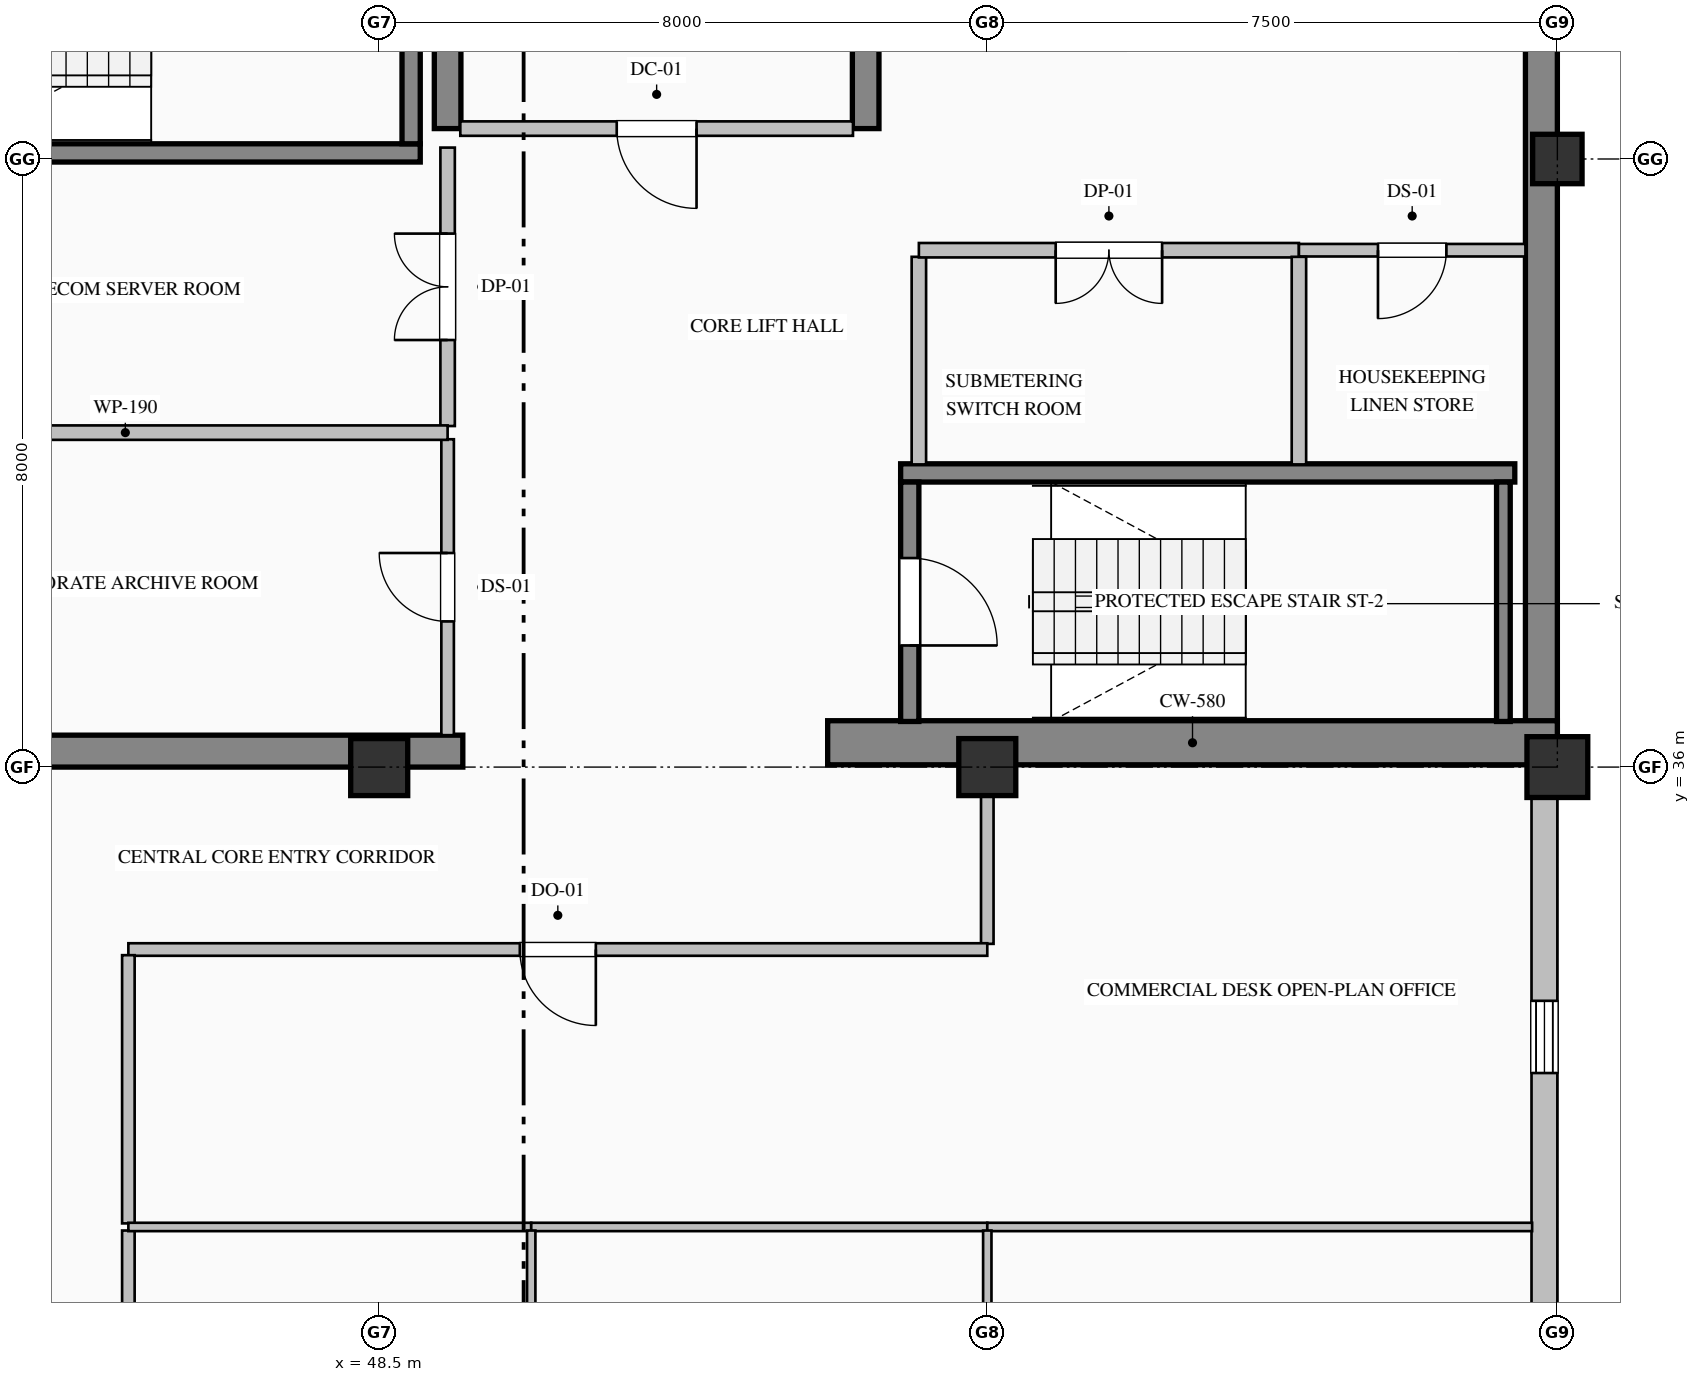
"""IFC4 building model, lengths in metres.
Left out: names, types, materials, properties, quantities, classifications, styles, units other than length and angle.
Written with IfcOpenShell. Run it as: python <this file> out.ifc"""

import sys

from ifc_helpers import new_model, si_unit, direction, frame, frame_2d, origin, origin_2d, place, context, subcontext, project, spatial, rectangle, hollow_rectangle, extrude, element, fill, save


model = new_model("IFC4")
c1 = context("Model", 3, precision=1e-05, world=origin(), true_north=direction((0.0, 1.0)))
c2 = subcontext(c1, "Body", "Model", "MODEL_VIEW")
j1 = project(units=[si_unit("LENGTHUNIT", "METRE"), si_unit("PLANEANGLEUNIT", "RADIAN")], contexts=[c1])
p1 = place(None, origin())
s1 = spatial("IfcSite", under=j1, at=p1, CompositionType="ELEMENT")
p2 = place(p1, origin())
s2 = spatial("IfcBuilding", under=s1, at=p2, CompositionType="ELEMENT")
p3 = place(p2, frame((0.0, 0.0, 359.2)))
s3 = spatial("IfcBuildingStorey", under=s2, at=p3, CompositionType="ELEMENT", Elevation=359.2)
p4 = place(p3, frame((63.79, 36.32, 0.0), z_axis=(0.0, 0.0, 1.0), x_axis=(0.0, 1.0, 0.0)))
e1 = element("IfcWall", 1, at=p4, inside=s3, PredefinedType="SHEAR", context=c2, shape_type="SweptSolid", body=[
    extrude(rectangle(XDim=15.26, YDim=0.42, at=frame_2d((7.63, 0.0))), origin(), (0.0, 0.0, 1.0), 3.785),
])
p5 = place(p3, frame((40.5, 36.21, 0.0), z_axis=(0.0, 0.0, 1.0), x_axis=(1.0, 0.0, 0.0)))
e2 = element("IfcWall", 2, at=p5, inside=s3, PredefinedType="SHEAR", context=c2, shape_type="SweptSolid", body=[
    extrude(rectangle(XDim=9.1, YDim=0.42, at=frame_2d((4.55, 0.0))), origin(), (0.0, 0.0, 1.0), 3.785),
])
p6 = place(p3, frame((54.4, 36.32, 0.0), z_axis=(0.0, 0.0, 1.0), x_axis=(1.0, 0.0, 0.0)))
e3 = element("IfcWall", 3, at=p6, inside=s3, PredefinedType="SHEAR", context=c2, shape_type="SweptSolid", body=[
    extrude(rectangle(XDim=9.6, YDim=0.58, at=frame_2d((4.8, 0.0))), origin(), (0.0, 0.0, 1.0), 4.0),
])
p7 = place(p3, frame((49.4, 44.4, 0.0), z_axis=(0.0, 0.0, 1.0), x_axis=(0.0, 1.0, 0.0)))
e4 = element("IfcWall", 4, at=p7, inside=s3, PredefinedType="SHEAR", context=c2, shape_type="SweptSolid", body=[
    extrude(rectangle(XDim=3.0, YDim=0.35, at=frame_2d((1.5, 0.0))), origin(), (0.0, 0.0, 1.0), 3.785),
])
p8 = place(p3, frame((54.9, 44.4, 0.0), z_axis=(0.0, 0.0, 1.0), x_axis=(0.0, 1.0, 0.0)))
e5 = element("IfcWall", 5, at=p8, inside=s3, PredefinedType="SHEAR", context=c2, shape_type="SweptSolid", body=[
    extrude(rectangle(XDim=7.18, YDim=0.35, at=frame_2d((3.59, 0.0))), origin(), (0.0, 0.0, 1.0), 3.785),
])
for number, where, z_axis, x_axis in (
    (6, (48.5, 36.0, 0.0), (0.0, 0.0, 1.0), (1.0, 0.0, 0.0)),
    (7, (56.5, 36.0, 0.0), (0.0, 0.0, 1.0), (1.0, 0.0, 0.0)),
):
    element("IfcColumn", number, at=place(p3, frame(where, z_axis=z_axis, x_axis=x_axis)), inside=s3, PredefinedType="COLUMN", context=c2, shape_type="SweptSolid", body=[
        extrude(rectangle(XDim=0.75, YDim=0.75, at=origin_2d()), origin(), (0.0, 0.0, 1.0), 4.0),
    ])
p9 = place(p3, frame((64.0, 36.0, 0.0), z_axis=(0.0, 0.0, 1.0), x_axis=(1.0, 0.0, 0.0)))
e8 = element("IfcColumn", 8, at=p9, inside=s3, PredefinedType="COLUMN", context=c2, shape_type="SweptSolid", body=[
    extrude(hollow_rectangle(XDim=0.8, YDim=0.8, WallThickness=0.032, at=origin_2d()), origin(), (0.0, 0.0, 1.0), 4.0),
])
p10 = place(p3, frame((64.0, 44.0, 0.0), z_axis=(0.0, 0.0, 1.0), x_axis=(1.0, 0.0, 0.0)))
e9 = element("IfcColumn", 9, at=p10, inside=s3, PredefinedType="COLUMN", context=c2, shape_type="SweptSolid", body=[
    extrude(hollow_rectangle(XDim=0.65, YDim=0.65, WallThickness=0.028, at=origin_2d()), origin(), (0.0, 0.0, 1.0), 4.0),
])
p11 = place(p3, frame((63.83, 36.05, 0.0), z_axis=(0.0, 0.0, 1.0), x_axis=(0.0, -1.0, 0.0)))
e10 = element("IfcWall", 10, at=p11, inside=s3, PredefinedType="SOLIDWALL", context=c2, shape_type="SweptSolid", body=[
    extrude(rectangle(XDim=13.55, YDim=0.34, at=frame_2d((6.775, 0.0))), origin(), (0.0, 0.0, 1.0), 3.335),
])
p12 = place(p11, frame((3.125, 0.0, 0.9)))
e11 = element("IfcOpeningElement", 11, at=p12, cuts=e10, PredefinedType="OPENING", context=c2, shape_type="SweptSolid", body=[
    extrude(rectangle(XDim=0.95, YDim=1.85, at=frame_2d((0.475, 0.925))), frame((0.0, 0.18, 0.0), z_axis=(0.0, -1.0, 0.0), x_axis=(1.0, 0.0, 0.0)), (0.0, 0.0, 1.0), 0.36),
])
p13 = place(p3, frame((49.04, 44.08, 0.0), z_axis=(0.0, 0.0, 1.0), x_axis=(-1.0, 0.0, 0.0)))
e12 = element("IfcWall", 12, at=p13, inside=s3, PredefinedType="SOLIDWALL", context=c2, shape_type="SweptSolid", body=[
    extrude(rectangle(XDim=8.08, YDim=0.24, at=frame_2d((4.04, 0.0))), origin(), (0.0, 0.0, 1.0), 4.0),
])
p14 = place(p3, frame((48.92, 44.2, 0.0), z_axis=(0.0, 0.0, 1.0), x_axis=(0.0, 1.0, 0.0)))
e13 = element("IfcWall", 13, at=p14, inside=s3, PredefinedType="SOLIDWALL", context=c2, shape_type="SweptSolid", body=[
    extrude(rectangle(XDim=3.15, YDim=0.24, at=frame_2d((1.575, 0.0))), origin(), (0.0, 0.0, 1.0), 4.0),
])
p15 = place(p3, frame((55.36, 39.87, 0.0), z_axis=(0.0, 0.0, 1.0), x_axis=(1.0, 0.0, 0.0)))
e14 = element("IfcWall", 14, at=p15, inside=s3, PredefinedType="SOLIDWALL", context=c2, shape_type="SweptSolid", body=[
    extrude(rectangle(XDim=8.08, YDim=0.24, at=frame_2d((4.04, 0.0))), origin(), (0.0, 0.0, 1.0), 4.0),
])
p16 = place(p3, frame((55.48, 39.75, 0.0), z_axis=(0.0, 0.0, 1.0), x_axis=(0.0, -1.0, 0.0)))
e15 = element("IfcWall", 15, at=p16, inside=s3, PredefinedType="SOLIDWALL", context=c2, shape_type="SweptSolid", body=[
    extrude(rectangle(XDim=3.15, YDim=0.24, at=frame_2d((1.575, 0.0))), origin(), (0.0, 0.0, 1.0), 4.0),
])
p17 = place(p16, frame((1.0, 0.0, 0.0)))
e16 = element("IfcOpeningElement", 16, at=p17, cuts=e15, PredefinedType="OPENING", context=c2, shape_type="SweptSolid", body=[
    extrude(rectangle(XDim=1.15, YDim=2.2, at=frame_2d((0.575, 1.1))), frame((0.0, 0.13, 0.0), z_axis=(0.0, -1.0, 0.0), x_axis=(1.0, 0.0, 0.0)), (0.0, 0.0, 1.0), 0.26),
])
p18 = place(p3, frame((63.29, 36.6, 0.0), z_axis=(0.0, 0.0, 1.0), x_axis=(0.0, 1.0, 0.0)))
e17 = element("IfcWall", 17, at=p18, inside=s3, PredefinedType="SOLIDWALL", context=c2, shape_type="SweptSolid", body=[
    extrude(rectangle(XDim=3.15, YDim=0.18, at=frame_2d((1.575, 0.0))), origin(), (0.0, 0.0, 1.0), 4.0),
])
p19 = place(p3, frame((54.733, 44.4, 0.0), z_axis=(0.0, 0.0, 1.0), x_axis=(-1.0, 0.0, 0.0)))
e18 = element("IfcWall", 18, at=p19, inside=s3, PredefinedType="PARTITIONING", context=c2, shape_type="SweptSolid", body=[
    extrude(rectangle(XDim=5.166, YDim=0.19, at=frame_2d((2.583, 0.0))), origin(), (0.0, 0.0, 1.0), 3.785),
])
p20 = place(p19, frame((2.058, 0.0, 0.0)))
e19 = element("IfcOpeningElement", 19, at=p20, cuts=e18, PredefinedType="OPENING", context=c2, shape_type="SweptSolid", body=[
    extrude(rectangle(XDim=1.05, YDim=2.15, at=frame_2d((0.525, 1.075))), frame((0.0, 0.105, 0.0), z_axis=(0.0, -1.0, 0.0), x_axis=(1.0, 0.0, 0.0)), (0.0, 0.0, 1.0), 0.21),
])
p21 = place(p3, frame((49.4, 36.42, 0.0), z_axis=(0.0, 0.0, 1.0), x_axis=(0.0, 1.0, 0.0)))
e20 = element("IfcWall", 20, at=p21, inside=s3, PredefinedType="PARTITIONING", context=c2, shape_type="SweptSolid", body=[
    extrude(rectangle(XDim=3.893, YDim=0.165, at=frame_2d((1.947, 0.0))), origin(), (0.0, 0.0, 1.0), 3.027),
])
p22 = place(p21, frame((1.497, 0.0, 0.0)))
e21 = element("IfcOpeningElement", 21, at=p22, cuts=e20, PredefinedType="OPENING", context=c2, shape_type="SweptSolid", body=[
    extrude(rectangle(XDim=0.9, YDim=2.15, at=frame_2d((0.45, 1.075))), frame((0.0, 0.093, 0.0), z_axis=(0.0, -1.0, 0.0), x_axis=(1.0, 0.0, 0.0)), (0.0, 0.0, 1.0), 0.185),
])
p23 = place(p3, frame((49.4, 40.487, 0.0), z_axis=(0.0, 0.0, 1.0), x_axis=(0.0, 1.0, 0.0)))
e22 = element("IfcWall", 22, at=p23, inside=s3, PredefinedType="PARTITIONING", context=c2, shape_type="SweptSolid", body=[
    extrude(rectangle(XDim=3.663, YDim=0.19, at=frame_2d((1.832, 0.0))), origin(), (0.0, 0.0, 1.0), 3.027),
])
p24 = place(p23, frame((1.132, 0.0, 0.0)))
e23 = element("IfcOpeningElement", 23, at=p24, cuts=e22, PredefinedType="OPENING", context=c2, shape_type="SweptSolid", body=[
    extrude(rectangle(XDim=1.4, YDim=2.25, at=frame_2d((0.7, 1.125))), frame((0.0, 0.105, 0.0), z_axis=(0.0, -1.0, 0.0), x_axis=(1.0, 0.0, 0.0)), (0.0, 0.0, 1.0), 0.21),
])
p25 = place(p3, frame((55.6, 42.713, 0.0), z_axis=(0.0, 0.0, 1.0), x_axis=(0.0, -1.0, 0.0)))
e24 = element("IfcWall", 24, at=p25, inside=s3, PredefinedType="PARTITIONING", context=c2, shape_type="SweptSolid", body=[
    extrude(rectangle(XDim=2.731, YDim=0.19, at=frame_2d((1.365, 0.0))), origin(), (0.0, 0.0, 1.0), 3.785),
])
p26 = place(p3, frame((40.92, 40.4, 0.0), z_axis=(0.0, 0.0, 1.0), x_axis=(1.0, 0.0, 0.0)))
e25 = element("IfcWall", 25, at=p26, inside=s3, PredefinedType="PARTITIONING", context=c2, shape_type="SweptSolid", body=[
    extrude(rectangle(XDim=8.48, YDim=0.19, at=frame_2d((4.24, 0.0))), origin(), (0.0, 0.0, 1.0), 3.785),
])
p27 = place(p3, frame((60.6, 42.8, 0.0), z_axis=(0.0, 0.0, 1.0), x_axis=(-1.0, 0.0, 0.0)))
e26 = element("IfcWall", 26, at=p27, inside=s3, PredefinedType="PARTITIONING", context=c2, shape_type="SweptSolid", body=[
    extrude(rectangle(XDim=5.0, YDim=0.19, at=frame_2d((2.5, 0.0))), origin(), (0.0, 0.0, 1.0), 3.785),
])
p28 = place(p27, frame((1.8, 0.0, 0.0)))
e27 = element("IfcOpeningElement", 27, at=p28, cuts=e26, PredefinedType="OPENING", context=c2, shape_type="SweptSolid", body=[
    extrude(rectangle(XDim=1.4, YDim=2.25, at=frame_2d((0.7, 1.125))), frame((0.0, 0.105, 0.0), z_axis=(0.0, -1.0, 0.0), x_axis=(1.0, 0.0, 0.0)), (0.0, 0.0, 1.0), 0.21),
])
p29 = place(p3, frame((63.58, 42.8, 0.0), z_axis=(0.0, 0.0, 1.0), x_axis=(-1.0, 0.0, 0.0)))
e28 = element("IfcWall", 28, at=p29, inside=s3, PredefinedType="PARTITIONING", context=c2, shape_type="SweptSolid", body=[
    extrude(rectangle(XDim=2.98, YDim=0.165, at=frame_2d((1.49, 0.0))), origin(), (0.0, 0.0, 1.0), 3.785),
])
p30 = place(p29, frame((1.04, 0.0, 0.0)))
e29 = element("IfcOpeningElement", 29, at=p30, cuts=e28, PredefinedType="OPENING", context=c2, shape_type="SweptSolid", body=[
    extrude(rectangle(XDim=0.9, YDim=2.15, at=frame_2d((0.45, 1.075))), frame((0.0, 0.093, 0.0), z_axis=(0.0, -1.0, 0.0), x_axis=(1.0, 0.0, 0.0)), (0.0, 0.0, 1.0), 0.185),
])
p31 = place(p3, frame((60.6, 42.713, 0.0), z_axis=(0.0, 0.0, 1.0), x_axis=(0.0, -1.0, 0.0)))
e30 = element("IfcWall", 30, at=p31, inside=s3, PredefinedType="PARTITIONING", context=c2, shape_type="SweptSolid", body=[
    extrude(rectangle(XDim=2.731, YDim=0.19, at=frame_2d((1.365, 0.0))), origin(), (0.0, 0.0, 1.0), 3.785),
])
p32 = place(p3, frame((56.5, 36.0, 0.0), z_axis=(0.0, 0.0, 1.0), x_axis=(0.0, -1.0, 0.0)))
e31 = element("IfcWall", 31, at=p32, inside=s3, PredefinedType="PARTITIONING", context=c2, shape_type="SweptSolid", body=[
    extrude(rectangle(XDim=2.325, YDim=0.165, at=frame_2d((1.163, 0.0))), origin(), (0.0, 0.0, 1.0), 3.177),
])
p33 = place(p3, frame((56.5, 33.6, 0.0), z_axis=(0.0, 0.0, 1.0), x_axis=(-1.0, 0.0, 0.0)))
e32 = element("IfcWall", 32, at=p33, inside=s3, PredefinedType="PARTITIONING", context=c2, shape_type="SweptSolid", body=[
    extrude(rectangle(XDim=11.3, YDim=0.165, at=frame_2d((5.65, 0.0))), origin(), (0.0, 0.0, 1.0), 3.785),
])
p34 = place(p33, frame((5.15, 0.0, 0.0)))
e33 = element("IfcOpeningElement", 33, at=p34, cuts=e32, PredefinedType="OPENING", context=c2, shape_type="SweptSolid", body=[
    extrude(rectangle(XDim=1.0, YDim=2.15, at=frame_2d((0.5, 1.075))), frame((0.0, 0.093, 0.0), z_axis=(0.0, -1.0, 0.0), x_axis=(1.0, 0.0, 0.0)), (0.0, 0.0, 1.0), 0.185),
])
p35 = place(p3, frame((45.2, 33.525, 0.0), z_axis=(0.0, 0.0, 1.0), x_axis=(0.0, -1.0, 0.0)))
e34 = element("IfcWall", 34, at=p35, inside=s3, PredefinedType="PARTITIONING", context=c2, shape_type="SweptSolid", body=[
    extrude(rectangle(XDim=3.528, YDim=0.165, at=frame_2d((1.764, 0.0))), origin(), (0.0, 0.0, 1.0), 3.785),
])
p36 = place(p3, frame((45.2, 29.903, 0.0), z_axis=(0.0, 0.0, 1.0), x_axis=(0.0, -1.0, 0.0)))
e35 = element("IfcWall", 35, at=p36, inside=s3, PredefinedType="PARTITIONING", context=c2, shape_type="SweptSolid", body=[
    extrude(rectangle(XDim=4.829, YDim=0.165, at=frame_2d((2.414, 0.0))), origin(), (0.0, 0.0, 1.0), 3.785),
])
p37 = place(p3, frame((50.5, 29.95, 0.0), z_axis=(0.0, 0.0, 1.0), x_axis=(-1.0, 0.0, 0.0)))
e36 = element("IfcWall", 36, at=p37, inside=s3, PredefinedType="MOVABLE", context=c2, shape_type="SweptSolid", body=[
    extrude(rectangle(XDim=5.3, YDim=0.11, at=frame_2d((2.65, 0.0))), origin(), (0.0, 0.0, 1.0), 3.785),
])
p38 = place(p3, frame((56.5, 29.95, 0.0), z_axis=(0.0, 0.0, 1.0), x_axis=(-1.0, 0.0, 0.0)))
e37 = element("IfcWall", 37, at=p38, inside=s3, PredefinedType="MOVABLE", context=c2, shape_type="SweptSolid", body=[
    extrude(rectangle(XDim=6.0, YDim=0.11, at=frame_2d((3.0, 0.0))), origin(), (0.0, 0.0, 1.0), 3.785),
])
p39 = place(p3, frame((63.668, 29.95, 0.0), z_axis=(0.0, 0.0, 1.0), x_axis=(-1.0, 0.0, 0.0)))
e38 = element("IfcWall", 38, at=p39, inside=s3, PredefinedType="MOVABLE", context=c2, shape_type="SweptSolid", body=[
    extrude(rectangle(XDim=7.168, YDim=0.11, at=frame_2d((3.584, 0.0))), origin(), (0.0, 0.0, 1.0), 3.785),
])
p40 = place(p3, frame((50.5, 29.903, 0.0), z_axis=(0.0, 0.0, 1.0), x_axis=(0.0, -1.0, 0.0)))
e39 = element("IfcWall", 39, at=p40, inside=s3, PredefinedType="MOVABLE", context=c2, shape_type="SweptSolid", body=[
    extrude(rectangle(XDim=4.829, YDim=0.11, at=frame_2d((2.414, 0.0))), origin(), (0.0, 0.0, 1.0), 3.785),
])
p41 = place(p3, frame((56.5, 29.903, 0.0), z_axis=(0.0, 0.0, 1.0), x_axis=(0.0, -1.0, 0.0)))
e40 = element("IfcWall", 40, at=p41, inside=s3, PredefinedType="MOVABLE", context=c2, shape_type="SweptSolid", body=[
    extrude(rectangle(XDim=4.829, YDim=0.11, at=frame_2d((2.414, 0.0))), origin(), (0.0, 0.0, 1.0), 2.977),
])
p42 = place(p12, origin())
e41 = element("IfcWindow", 41, at=p42, inside=s3, PartitioningType="SINGLE_PANEL", PredefinedType="WINDOW", context=c2, shape_type="SweptSolid", body=[
    extrude(rectangle(XDim=0.95, YDim=1.85, at=frame_2d((0.475, 0.925))), frame((0.0, 0.15, 0.0), z_axis=(0.0, -1.0, 0.0), x_axis=(1.0, 0.0, 0.0)), (0.0, 0.0, 1.0), 0.06),
])
fill(e11, e41)
p43 = place(p17, origin())
e42 = element("IfcDoor", 42, at=p43, inside=s3, OperationType="SINGLE_SWING_RIGHT", PredefinedType="DOOR", context=c2, shape_type="SweptSolid", body=[
    extrude(rectangle(XDim=1.15, YDim=2.2, at=frame_2d((0.575, 1.1))), frame((0.0, 0.025, 0.0), z_axis=(0.0, -1.0, 0.0), x_axis=(1.0, 0.0, 0.0)), (0.0, 0.0, 1.0), 0.05),
])
fill(e16, e42)
p44 = place(p20, origin())
e43 = element("IfcDoor", 43, at=p44, inside=s3, OperationType="SINGLE_SWING_LEFT", PredefinedType="DOOR", context=c2, shape_type="SweptSolid", body=[
    extrude(rectangle(XDim=1.05, YDim=2.15, at=frame_2d((0.525, 1.075))), frame((0.0, 0.025, 0.0), z_axis=(0.0, -1.0, 0.0), x_axis=(1.0, 0.0, 0.0)), (0.0, 0.0, 1.0), 0.05),
])
fill(e19, e43)
p45 = place(p22, origin())
e44 = element("IfcDoor", 44, at=p45, inside=s3, OperationType="SINGLE_SWING_RIGHT", PredefinedType="DOOR", context=c2, shape_type="SweptSolid", body=[
    extrude(rectangle(XDim=0.9, YDim=2.15, at=frame_2d((0.45, 1.075))), frame((0.0, 0.025, 0.0), z_axis=(0.0, -1.0, 0.0), x_axis=(1.0, 0.0, 0.0)), (0.0, 0.0, 1.0), 0.05),
])
fill(e21, e44)
p46 = place(p24, origin())
e45 = element("IfcDoor", 45, at=p46, inside=s3, OperationType="DOUBLE_DOOR_SINGLE_SWING", PredefinedType="DOOR", context=c2, shape_type="SweptSolid", body=[
    extrude(rectangle(XDim=1.4, YDim=2.25, at=frame_2d((0.7, 1.125))), frame((0.0, 0.025, 0.0), z_axis=(0.0, -1.0, 0.0), x_axis=(1.0, 0.0, 0.0)), (0.0, 0.0, 1.0), 0.05),
])
fill(e23, e45)
p47 = place(p28, origin())
e46 = element("IfcDoor", 46, at=p47, inside=s3, OperationType="DOUBLE_DOOR_SINGLE_SWING", PredefinedType="DOOR", context=c2, shape_type="SweptSolid", body=[
    extrude(rectangle(XDim=1.4, YDim=2.25, at=frame_2d((0.7, 1.125))), frame((0.0, 0.025, 0.0), z_axis=(0.0, -1.0, 0.0), x_axis=(1.0, 0.0, 0.0)), (0.0, 0.0, 1.0), 0.05),
])
fill(e27, e46)
p48 = place(p30, origin())
e47 = element("IfcDoor", 47, at=p48, inside=s3, OperationType="SINGLE_SWING_RIGHT", PredefinedType="DOOR", context=c2, shape_type="SweptSolid", body=[
    extrude(rectangle(XDim=0.9, YDim=2.15, at=frame_2d((0.45, 1.075))), frame((0.0, 0.025, 0.0), z_axis=(0.0, -1.0, 0.0), x_axis=(1.0, 0.0, 0.0)), (0.0, 0.0, 1.0), 0.05),
])
fill(e29, e47)
p49 = place(p34, origin())
e48 = element("IfcDoor", 48, at=p49, inside=s3, OperationType="SINGLE_SWING_LEFT", PredefinedType="DOOR", context=c2, shape_type="SweptSolid", body=[
    extrude(rectangle(XDim=1.0, YDim=2.15, at=frame_2d((0.5, 1.075))), frame((0.0, 0.025, 0.0), z_axis=(0.0, -1.0, 0.0), x_axis=(1.0, 0.0, 0.0)), (0.0, 0.0, 1.0), 0.05),
])
fill(e33, e48)
save(model, sys.argv[1])
